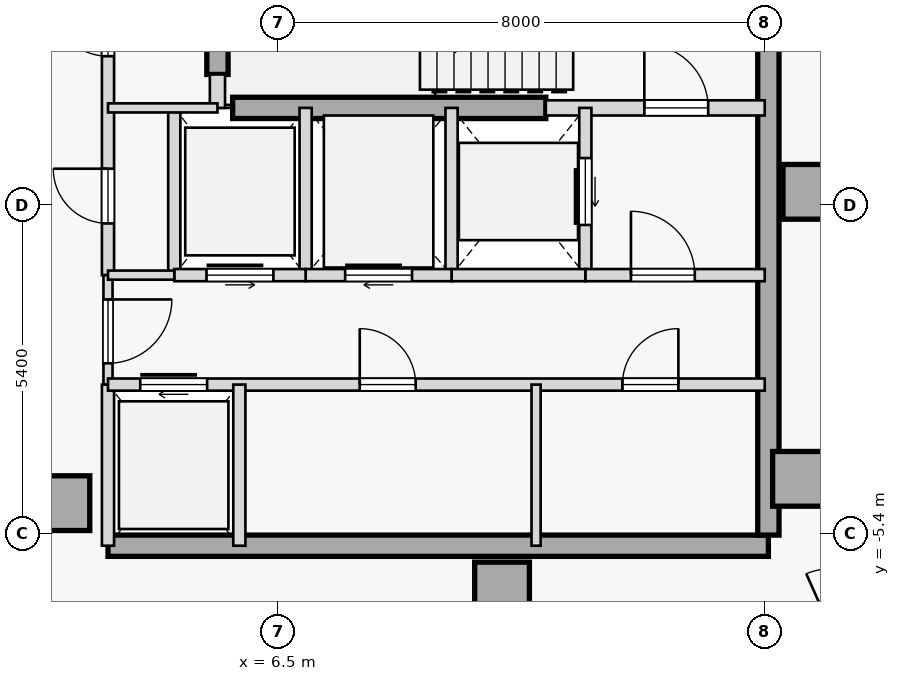
"""IFC4 building model, lengths in metres.
Left out: names, types, materials, properties, quantities, classifications, styles, units other than length and angle.
Written with IfcOpenShell. Run it as: python <this file> out.ifc"""

import sys

from ifc_helpers import new_model, si_unit, direction, frame, frame_2d, origin, origin_2d, place, context, subcontext, project, spatial, rectangle, extrude, element, fill, save


model = new_model("IFC4")
c1 = context("Model", 3, precision=1e-05, world=origin(), true_north=direction((0.0, 1.0)))
c2 = subcontext(c1, "Body", "Model", "MODEL_VIEW")
j1 = project(units=[si_unit("LENGTHUNIT", "METRE"), si_unit("PLANEANGLEUNIT", "RADIAN")], contexts=[c1])
p1 = place(None, origin())
s1 = spatial("IfcSite", under=j1, at=p1, CompositionType="ELEMENT")
p2 = place(p1, origin())
s2 = spatial("IfcBuilding", under=s1, at=p2, CompositionType="ELEMENT")
p3 = place(p2, frame((0.0, 0.0, 288.6)))
s3 = spatial("IfcBuildingStorey", under=s2, at=p3, CompositionType="ELEMENT", Elevation=288.6)
for number, where, z_axis, x_axis in (
    (1, (15.25, 0.22, 0.0), (0.0, 0.0, 1.0), (1.0, 0.0, 0.0)),
    (2, (15.08, -4.5, 0.0), (0.0, 0.0, 1.0), (1.0, 0.0, 0.0)),
    (3, (10.18, -6.32, 0.0), (0.0, 0.0, 1.0), (1.0, 0.0, 0.0)),
    (4, (2.95, -4.9, 0.0), (0.0, 0.0, 1.0), (1.0, 0.0, 0.0)),
):
    element("IfcColumn", number, at=place(p3, frame(where, z_axis=z_axis, x_axis=x_axis)), inside=s3, PredefinedType="COLUMN", context=c2, shape_type="SweptSolid", body=[
        extrude(rectangle(XDim=0.9, YDim=0.9, at=origin_2d()), origin(), (0.0, 0.0, 1.0), 3.35),
    ])
p4 = place(p3, frame((3.7, -5.6, 0.0), z_axis=(0.0, 0.0, 1.0), x_axis=(1.0, 0.0, 0.0)))
e5 = element("IfcWall", 5, at=p4, inside=s3, PredefinedType="SHEAR", context=c2, shape_type="SweptSolid", body=[
    extrude(rectangle(XDim=10.86, YDim=0.35, at=frame_2d((5.43, 0.0))), origin(), (0.0, 0.0, 1.0), 3.125),
])
p5 = place(p3, frame((14.56, -5.425, 0.0), z_axis=(0.0, 0.0, 1.0), x_axis=(0.0, 1.0, 0.0)))
e6 = element("IfcWall", 6, at=p5, inside=s3, PredefinedType="SHEAR", context=c2, shape_type="SweptSolid", body=[
    extrude(rectangle(XDim=10.85, YDim=0.35, at=frame_2d((5.425, 0.0))), origin(), (0.0, 0.0, 1.0), 3.125),
])
p6 = place(p3, frame((5.5, 2.15, 0.0), z_axis=(0.0, 0.0, 1.0), x_axis=(0.0, 1.0, 0.0)))
e7 = element("IfcWall", 7, at=p6, inside=s3, PredefinedType="SHEAR", context=c2, shape_type="SweptSolid", body=[
    extrude(rectangle(XDim=3.275, YDim=0.35, at=frame_2d((1.638, 0.0))), origin(), (0.0, 0.0, 1.0), 3.125),
])
p7 = place(p3, frame((5.75, 1.6, 0.0), z_axis=(0.0, 0.0, 1.0), x_axis=(1.0, 0.0, 0.0)))
e8 = element("IfcWall", 8, at=p7, inside=s3, PredefinedType="SHEAR", context=c2, shape_type="SweptSolid", body=[
    extrude(rectangle(XDim=5.15, YDim=0.35, at=frame_2d((2.575, 0.0))), origin(), (0.0, 0.0, 1.0), 3.125),
])
p8 = place(p3, frame((10.9, 1.6, 0.0), z_axis=(0.0, 0.0, 1.0), x_axis=(1.0, 0.0, 0.0)))
e9 = element("IfcWall", 9, at=p8, inside=s3, PredefinedType="STANDARD", context=c2, shape_type="SweptSolid", body=[
    extrude(rectangle(XDim=3.6, YDim=0.25, at=frame_2d((1.8, 0.0))), origin(), (0.0, 0.0, 1.0), 3.125),
])
p9 = place(p8, frame((1.62, 0.0, 0.0)))
e10 = element("IfcOpeningElement", 10, at=p9, cuts=e9, PredefinedType="OPENING", context=c2, shape_type="SweptSolid", body=[
    extrude(rectangle(XDim=1.05, YDim=2.15, at=frame_2d((0.525, 1.075))), frame((0.0, 0.135, 0.0), z_axis=(0.0, -1.0, 0.0), x_axis=(1.0, 0.0, 0.0)), (0.0, 0.0, 1.0), 0.27),
])
p10 = place(p3, frame((5.5, 1.6, 0.0), z_axis=(0.0, 0.0, 1.0), x_axis=(0.0, 1.0, 0.0)))
e11 = element("IfcWall", 11, at=p10, inside=s3, PredefinedType="STANDARD", context=c2, shape_type="SweptSolid", body=[
    extrude(rectangle(XDim=0.55, YDim=0.25, at=frame_2d((0.275, 0.0))), origin(), (0.0, 0.0, 1.0), 3.125),
])
p11 = place(p3, frame((3.7, -1.15, 0.0), z_axis=(0.0, 0.0, 1.0), x_axis=(0.0, 1.0, 0.0)))
e12 = element("IfcWall", 12, at=p11, inside=s3, PredefinedType="STANDARD", context=c2, shape_type="SweptSolid", body=[
    extrude(rectangle(XDim=6.75, YDim=0.2, at=frame_2d((3.375, 0.0))), origin(), (0.0, 0.0, 1.0), 3.125),
])
p12 = place(p11, frame((3.6, 0.0, 0.0)))
e13 = element("IfcOpeningElement", 13, at=p12, cuts=e12, PredefinedType="OPENING", context=c2, shape_type="SweptSolid", body=[
    extrude(rectangle(XDim=0.92, YDim=2.15, at=frame_2d((0.46, 1.075))), frame((0.0, 0.11, 0.0), z_axis=(0.0, -1.0, 0.0), x_axis=(1.0, 0.0, 0.0)), (0.0, 0.0, 1.0), 0.22),
])
p13 = place(p11, frame((0.85, 0.0, 0.0)))
e14 = element("IfcOpeningElement", 14, at=p13, cuts=e12, PredefinedType="OPENING", context=c2, shape_type="SweptSolid", body=[
    extrude(rectangle(XDim=0.9, YDim=2.15, at=frame_2d((0.45, 1.075))), frame((0.0, 0.11, 0.0), z_axis=(0.0, -1.0, 0.0), x_axis=(1.0, 0.0, 0.0)), (0.0, 0.0, 1.0), 0.22),
])
p14 = place(p3, frame((3.7, -2.95, 0.0), z_axis=(0.0, 0.0, 1.0), x_axis=(0.0, 1.0, 0.0)))
e15 = element("IfcWall", 15, at=p14, inside=s3, PredefinedType="PARTITIONING", context=c2, shape_type="SweptSolid", body=[
    extrude(rectangle(XDim=1.8, YDim=0.15, at=frame_2d((0.9, 0.0))), origin(), (0.0, 0.0, 1.0), 3.125),
])
p15 = place(p14, frame((0.35, 0.0, 0.0)))
e16 = element("IfcOpeningElement", 16, at=p15, cuts=e15, PredefinedType="OPENING", context=c2, shape_type="SweptSolid", body=[
    extrude(rectangle(XDim=1.05, YDim=2.18, at=frame_2d((0.525, 1.09))), frame((0.0, 0.085, 0.0), z_axis=(0.0, -1.0, 0.0), x_axis=(1.0, 0.0, 0.0)), (0.0, 0.0, 1.0), 0.17),
])
p16 = place(p3, frame((3.7, -5.6, 0.0), z_axis=(0.0, 0.0, 1.0), x_axis=(0.0, 1.0, 0.0)))
e17 = element("IfcWall", 17, at=p16, inside=s3, PredefinedType="STANDARD", context=c2, shape_type="SweptSolid", body=[
    extrude(rectangle(XDim=2.65, YDim=0.2, at=frame_2d((1.325, 0.0))), origin(), (0.0, 0.0, 1.0), 3.125),
])
p17 = place(p3, frame((11.55, -1.15, 0.0), z_axis=(0.0, 0.0, 1.0), x_axis=(0.0, 1.0, 0.0)))
e18 = element("IfcWall", 18, at=p17, inside=s3, PredefinedType="STANDARD", context=c2, shape_type="SweptSolid", body=[
    extrude(rectangle(XDim=2.75, YDim=0.2, at=frame_2d((1.375, 0.0))), origin(), (0.0, 0.0, 1.0), 3.125),
])
p18 = place(p17, frame((0.825, 0.0, 0.0)))
e19 = element("IfcOpeningElement", 19, at=p18, cuts=e18, PredefinedType="OPENING", context=c2, shape_type="SweptSolid", body=[
    extrude(rectangle(XDim=1.1, YDim=2.15, at=frame_2d((0.55, 1.075))), frame((0.0, 0.11, 0.0), z_axis=(0.0, -1.0, 0.0), x_axis=(1.0, 0.0, 0.0)), (0.0, 0.0, 1.0), 0.22),
])
p19 = place(p3, frame((9.35, -1.15, 0.0), z_axis=(0.0, 0.0, 1.0), x_axis=(0.0, 1.0, 0.0)))
e20 = element("IfcWall", 20, at=p19, inside=s3, PredefinedType="STANDARD", context=c2, shape_type="SweptSolid", body=[
    extrude(rectangle(XDim=2.75, YDim=0.2, at=frame_2d((1.375, 0.0))), origin(), (0.0, 0.0, 1.0), 3.125),
])
p20 = place(p3, frame((11.55, -1.15, 0.0), z_axis=(0.0, 0.0, 1.0), x_axis=(1.0, 0.0, 0.0)))
e21 = element("IfcWall", 21, at=p20, inside=s3, PredefinedType="STANDARD", context=c2, shape_type="SweptSolid", body=[
    extrude(rectangle(XDim=2.95, YDim=0.2, at=frame_2d((1.475, 0.0))), origin(), (0.0, 0.0, 1.0), 3.125),
])
p21 = place(p20, frame((0.75, 0.0, 0.0)))
e22 = element("IfcOpeningElement", 22, at=p21, cuts=e21, PredefinedType="OPENING", context=c2, shape_type="SweptSolid", body=[
    extrude(rectangle(XDim=1.05, YDim=2.18, at=frame_2d((0.525, 1.09))), frame((0.0, 0.11, 0.0), z_axis=(0.0, -1.0, 0.0), x_axis=(1.0, 0.0, 0.0)), (0.0, 0.0, 1.0), 0.22),
])
p22 = place(p3, frame((9.35, -1.15, 0.0), z_axis=(0.0, 0.0, 1.0), x_axis=(1.0, 0.0, 0.0)))
e23 = element("IfcWall", 23, at=p22, inside=s3, PredefinedType="STANDARD", context=c2, shape_type="SweptSolid", body=[
    extrude(rectangle(XDim=2.2, YDim=0.2, at=frame_2d((1.1, 0.0))), origin(), (0.0, 0.0, 1.0), 3.125),
])
p23 = place(p3, frame((6.95, -1.15, 0.0), z_axis=(0.0, 0.0, 1.0), x_axis=(0.0, 1.0, 0.0)))
e24 = element("IfcWall", 24, at=p23, inside=s3, PredefinedType="STANDARD", context=c2, shape_type="SweptSolid", body=[
    extrude(rectangle(XDim=2.75, YDim=0.2, at=frame_2d((1.375, 0.0))), origin(), (0.0, 0.0, 1.0), 3.125),
])
p24 = place(p3, frame((6.95, -1.15, 0.0), z_axis=(0.0, 0.0, 1.0), x_axis=(1.0, 0.0, 0.0)))
e25 = element("IfcWall", 25, at=p24, inside=s3, PredefinedType="STANDARD", context=c2, shape_type="SweptSolid", body=[
    extrude(rectangle(XDim=2.4, YDim=0.2, at=frame_2d((1.2, 0.0))), origin(), (0.0, 0.0, 1.0), 3.125),
])
p25 = place(p24, frame((0.65, 0.0, 0.0)))
e26 = element("IfcOpeningElement", 26, at=p25, cuts=e25, PredefinedType="OPENING", context=c2, shape_type="SweptSolid", body=[
    extrude(rectangle(XDim=1.1, YDim=2.15, at=frame_2d((0.55, 1.075))), frame((0.0, 0.11, 0.0), z_axis=(0.0, -1.0, 0.0), x_axis=(1.0, 0.0, 0.0)), (0.0, 0.0, 1.0), 0.22),
])
p26 = place(p3, frame((4.79, -1.15, 0.0), z_axis=(0.0, 0.0, 1.0), x_axis=(0.0, 1.0, 0.0)))
e27 = element("IfcWall", 27, at=p26, inside=s3, PredefinedType="STANDARD", context=c2, shape_type="SweptSolid", body=[
    extrude(rectangle(XDim=2.75, YDim=0.2, at=frame_2d((1.375, 0.0))), origin(), (0.0, 0.0, 1.0), 3.125),
])
p27 = place(p3, frame((4.79, -1.15, 0.0), z_axis=(0.0, 0.0, 1.0), x_axis=(1.0, 0.0, 0.0)))
e28 = element("IfcWall", 28, at=p27, inside=s3, PredefinedType="STANDARD", context=c2, shape_type="SweptSolid", body=[
    extrude(rectangle(XDim=2.16, YDim=0.2, at=frame_2d((1.08, 0.0))), origin(), (0.0, 0.0, 1.0), 3.125),
])
p28 = place(p27, frame((0.53, 0.0, 0.0)))
e29 = element("IfcOpeningElement", 29, at=p28, cuts=e28, PredefinedType="OPENING", context=c2, shape_type="SweptSolid", body=[
    extrude(rectangle(XDim=1.1, YDim=2.15, at=frame_2d((0.55, 1.075))), frame((0.0, 0.11, 0.0), z_axis=(0.0, -1.0, 0.0), x_axis=(1.0, 0.0, 0.0)), (0.0, 0.0, 1.0), 0.22),
])
p29 = place(p3, frame((3.7, -1.15, 0.0), z_axis=(0.0, 0.0, 1.0), x_axis=(1.0, 0.0, 0.0)))
e30 = element("IfcWall", 30, at=p29, inside=s3, PredefinedType="PARTITIONING", context=c2, shape_type="SweptSolid", body=[
    extrude(rectangle(XDim=1.09, YDim=0.15, at=frame_2d((0.545, 0.0))), origin(), (0.0, 0.0, 1.0), 3.125),
])
p30 = place(p3, frame((3.7, -2.95, 0.0), z_axis=(0.0, 0.0, 1.0), x_axis=(1.0, 0.0, 0.0)))
e31 = element("IfcWall", 31, at=p30, inside=s3, PredefinedType="STANDARD", context=c2, shape_type="SweptSolid", body=[
    extrude(rectangle(XDim=10.8, YDim=0.2, at=frame_2d((5.4, 0.0))), origin(), (0.0, 0.0, 1.0), 3.125),
])
p31 = place(p30, frame((0.53, 0.0, 0.0)))
e32 = element("IfcOpeningElement", 32, at=p31, cuts=e31, PredefinedType="OPENING", context=c2, shape_type="SweptSolid", body=[
    extrude(rectangle(XDim=1.1, YDim=2.15, at=frame_2d((0.55, 1.075))), frame((0.0, 0.11, 0.0), z_axis=(0.0, -1.0, 0.0), x_axis=(1.0, 0.0, 0.0)), (0.0, 0.0, 1.0), 0.22),
])
p32 = place(p30, frame((4.14, 0.0, 0.0)))
e33 = element("IfcOpeningElement", 33, at=p32, cuts=e31, PredefinedType="OPENING", context=c2, shape_type="SweptSolid", body=[
    extrude(rectangle(XDim=0.92, YDim=2.15, at=frame_2d((0.46, 1.075))), frame((0.0, 0.11, 0.0), z_axis=(0.0, -1.0, 0.0), x_axis=(1.0, 0.0, 0.0)), (0.0, 0.0, 1.0), 0.22),
])
p33 = place(p30, frame((8.46, 0.0, 0.0)))
e34 = element("IfcOpeningElement", 34, at=p33, cuts=e31, PredefinedType="OPENING", context=c2, shape_type="SweptSolid", body=[
    extrude(rectangle(XDim=0.92, YDim=2.15, at=frame_2d((0.46, 1.075))), frame((0.0, 0.11, 0.0), z_axis=(0.0, -1.0, 0.0), x_axis=(1.0, 0.0, 0.0)), (0.0, 0.0, 1.0), 0.22),
])
p34 = place(p3, frame((5.86, -5.6, 0.0), z_axis=(0.0, 0.0, 1.0), x_axis=(0.0, 1.0, 0.0)))
e35 = element("IfcWall", 35, at=p34, inside=s3, PredefinedType="STANDARD", context=c2, shape_type="SweptSolid", body=[
    extrude(rectangle(XDim=2.65, YDim=0.2, at=frame_2d((1.325, 0.0))), origin(), (0.0, 0.0, 1.0), 3.125),
])
p35 = place(p3, frame((10.74, -5.6, 0.0), z_axis=(0.0, 0.0, 1.0), x_axis=(0.0, 1.0, 0.0)))
e36 = element("IfcWall", 36, at=p35, inside=s3, PredefinedType="PARTITIONING", context=c2, shape_type="SweptSolid", body=[
    extrude(rectangle(XDim=2.65, YDim=0.15, at=frame_2d((1.325, 0.0))), origin(), (0.0, 0.0, 1.0), 3.125),
])
p36 = place(p3, frame((3.7, 1.6, 0.0), z_axis=(0.0, 0.0, 1.0), x_axis=(1.0, 0.0, 0.0)))
e37 = element("IfcWall", 37, at=p36, inside=s3, PredefinedType="PARTITIONING", context=c2, shape_type="SweptSolid", body=[
    extrude(rectangle(XDim=1.8, YDim=0.15, at=frame_2d((0.9, 0.0))), origin(), (0.0, 0.0, 1.0), 3.125),
])
p37 = place(p3, frame((12.635, -8.204, 0.0), z_axis=(0.0, 0.0, 1.0), x_axis=(0.913541702649, 0.406745076825, 0.0)))
e38 = element("IfcWall", 38, at=p37, inside=s3, PredefinedType="PARTITIONING", context=c2, shape_type="SweptSolid", body=[
    extrude(rectangle(XDim=7.318, YDim=0.15, at=frame_2d((3.659, 0.0))), origin(), (0.0, 0.0, 1.0), 3.125),
])
p38 = place(p37, frame((3.199, 0.0, 0.0)))
e39 = element("IfcOpeningElement", 39, at=p38, cuts=e38, PredefinedType="OPENING", context=c2, shape_type="SweptSolid", body=[
    extrude(rectangle(XDim=0.92, YDim=2.15, at=frame_2d((0.46, 1.075))), frame((0.0, 0.085, 0.0), z_axis=(0.0, -1.0, 0.0), x_axis=(1.0, 0.0, 0.0)), (0.0, 0.0, 1.0), 0.17),
])
p39 = place(p9, origin())
e40 = element("IfcDoor", 40, at=p39, inside=s3, OperationType="SINGLE_SWING_LEFT", PredefinedType="DOOR", context=c2, shape_type="SweptSolid", body=[
    extrude(rectangle(XDim=1.05, YDim=2.15, at=frame_2d((0.525, 1.075))), frame((0.0, 0.025, 0.0), z_axis=(0.0, -1.0, 0.0), x_axis=(1.0, 0.0, 0.0)), (0.0, 0.0, 1.0), 0.05),
])
fill(e10, e40)
p40 = place(p21, origin())
e41 = element("IfcDoor", 41, at=p40, inside=s3, OperationType="SINGLE_SWING_LEFT", PredefinedType="DOOR", context=c2, shape_type="SweptSolid", body=[
    extrude(rectangle(XDim=1.05, YDim=2.18, at=frame_2d((0.525, 1.09))), frame((0.0, 0.025, 0.0), z_axis=(0.0, -1.0, 0.0), x_axis=(1.0, 0.0, 0.0)), (0.0, 0.0, 1.0), 0.05),
])
fill(e22, e41)
p41 = place(p15, frame((1.05, 0.0, 0.0), z_axis=(0.0, 0.0, 1.0), x_axis=(-1.0, 0.0, 0.0)))
e42 = element("IfcDoor", 42, at=p41, inside=s3, OperationType="SINGLE_SWING_RIGHT", PredefinedType="DOOR", context=c2, shape_type="SweptSolid", body=[
    extrude(rectangle(XDim=1.05, YDim=2.18, at=frame_2d((0.525, 1.09))), frame((0.0, 0.025, 0.0), z_axis=(0.0, -1.0, 0.0), x_axis=(1.0, 0.0, 0.0)), (0.0, 0.0, 1.0), 0.05),
])
fill(e16, e42)
p42 = place(p18, origin())
e43 = element("IfcDoor", 43, at=p42, inside=s3, OperationType="SLIDING_TO_RIGHT", PredefinedType="DOOR", context=c2, shape_type="SweptSolid", body=[
    extrude(rectangle(XDim=1.1, YDim=2.15, at=frame_2d((0.55, 1.075))), frame((0.0, 0.025, 0.0), z_axis=(0.0, -1.0, 0.0), x_axis=(1.0, 0.0, 0.0)), (0.0, 0.0, 1.0), 0.05),
])
fill(e19, e43)
p43 = place(p25, origin())
e44 = element("IfcDoor", 44, at=p43, inside=s3, OperationType="SLIDING_TO_RIGHT", PredefinedType="DOOR", context=c2, shape_type="SweptSolid", body=[
    extrude(rectangle(XDim=1.1, YDim=2.15, at=frame_2d((0.55, 1.075))), frame((0.0, 0.025, 0.0), z_axis=(0.0, -1.0, 0.0), x_axis=(1.0, 0.0, 0.0)), (0.0, 0.0, 1.0), 0.05),
])
fill(e26, e44)
p44 = place(p28, origin())
e45 = element("IfcDoor", 45, at=p44, inside=s3, OperationType="SLIDING_TO_LEFT", PredefinedType="DOOR", context=c2, shape_type="SweptSolid", body=[
    extrude(rectangle(XDim=1.1, YDim=2.15, at=frame_2d((0.55, 1.075))), frame((0.0, 0.025, 0.0), z_axis=(0.0, -1.0, 0.0), x_axis=(1.0, 0.0, 0.0)), (0.0, 0.0, 1.0), 0.05),
])
fill(e29, e45)
p45 = place(p31, origin())
e46 = element("IfcDoor", 46, at=p45, inside=s3, OperationType="SLIDING_TO_RIGHT", PredefinedType="DOOR", context=c2, shape_type="SweptSolid", body=[
    extrude(rectangle(XDim=1.1, YDim=2.15, at=frame_2d((0.55, 1.075))), frame((0.0, 0.025, 0.0), z_axis=(0.0, -1.0, 0.0), x_axis=(1.0, 0.0, 0.0)), (0.0, 0.0, 1.0), 0.05),
])
fill(e32, e46)
p46 = place(p32, origin())
e47 = element("IfcDoor", 47, at=p46, inside=s3, OperationType="SINGLE_SWING_LEFT", PredefinedType="DOOR", context=c2, shape_type="SweptSolid", body=[
    extrude(rectangle(XDim=0.92, YDim=2.15, at=frame_2d((0.46, 1.075))), frame((0.0, 0.025, 0.0), z_axis=(0.0, -1.0, 0.0), x_axis=(1.0, 0.0, 0.0)), (0.0, 0.0, 1.0), 0.05),
])
fill(e33, e47)
p47 = place(p33, origin())
e48 = element("IfcDoor", 48, at=p47, inside=s3, OperationType="SINGLE_SWING_RIGHT", PredefinedType="DOOR", context=c2, shape_type="SweptSolid", body=[
    extrude(rectangle(XDim=0.92, YDim=2.15, at=frame_2d((0.46, 1.075))), frame((0.0, 0.025, 0.0), z_axis=(0.0, -1.0, 0.0), x_axis=(1.0, 0.0, 0.0)), (0.0, 0.0, 1.0), 0.05),
])
fill(e34, e48)
p48 = place(p12, origin())
e49 = element("IfcDoor", 49, at=p48, inside=s3, OperationType="SINGLE_SWING_RIGHT", PredefinedType="DOOR", context=c2, shape_type="SweptSolid", body=[
    extrude(rectangle(XDim=0.92, YDim=2.15, at=frame_2d((0.46, 1.075))), frame((0.0, 0.025, 0.0), z_axis=(0.0, -1.0, 0.0), x_axis=(1.0, 0.0, 0.0)), (0.0, 0.0, 1.0), 0.05),
])
fill(e13, e49)
p49 = place(p13, origin())
e50 = element("IfcDoor", 50, at=p49, inside=s3, OperationType="SINGLE_SWING_RIGHT", PredefinedType="DOOR", context=c2, shape_type="SweptSolid", body=[
    extrude(rectangle(XDim=0.9, YDim=2.15, at=frame_2d((0.45, 1.075))), frame((0.0, 0.025, 0.0), z_axis=(0.0, -1.0, 0.0), x_axis=(1.0, 0.0, 0.0)), (0.0, 0.0, 1.0), 0.05),
])
fill(e14, e50)
save(model, sys.argv[1])
